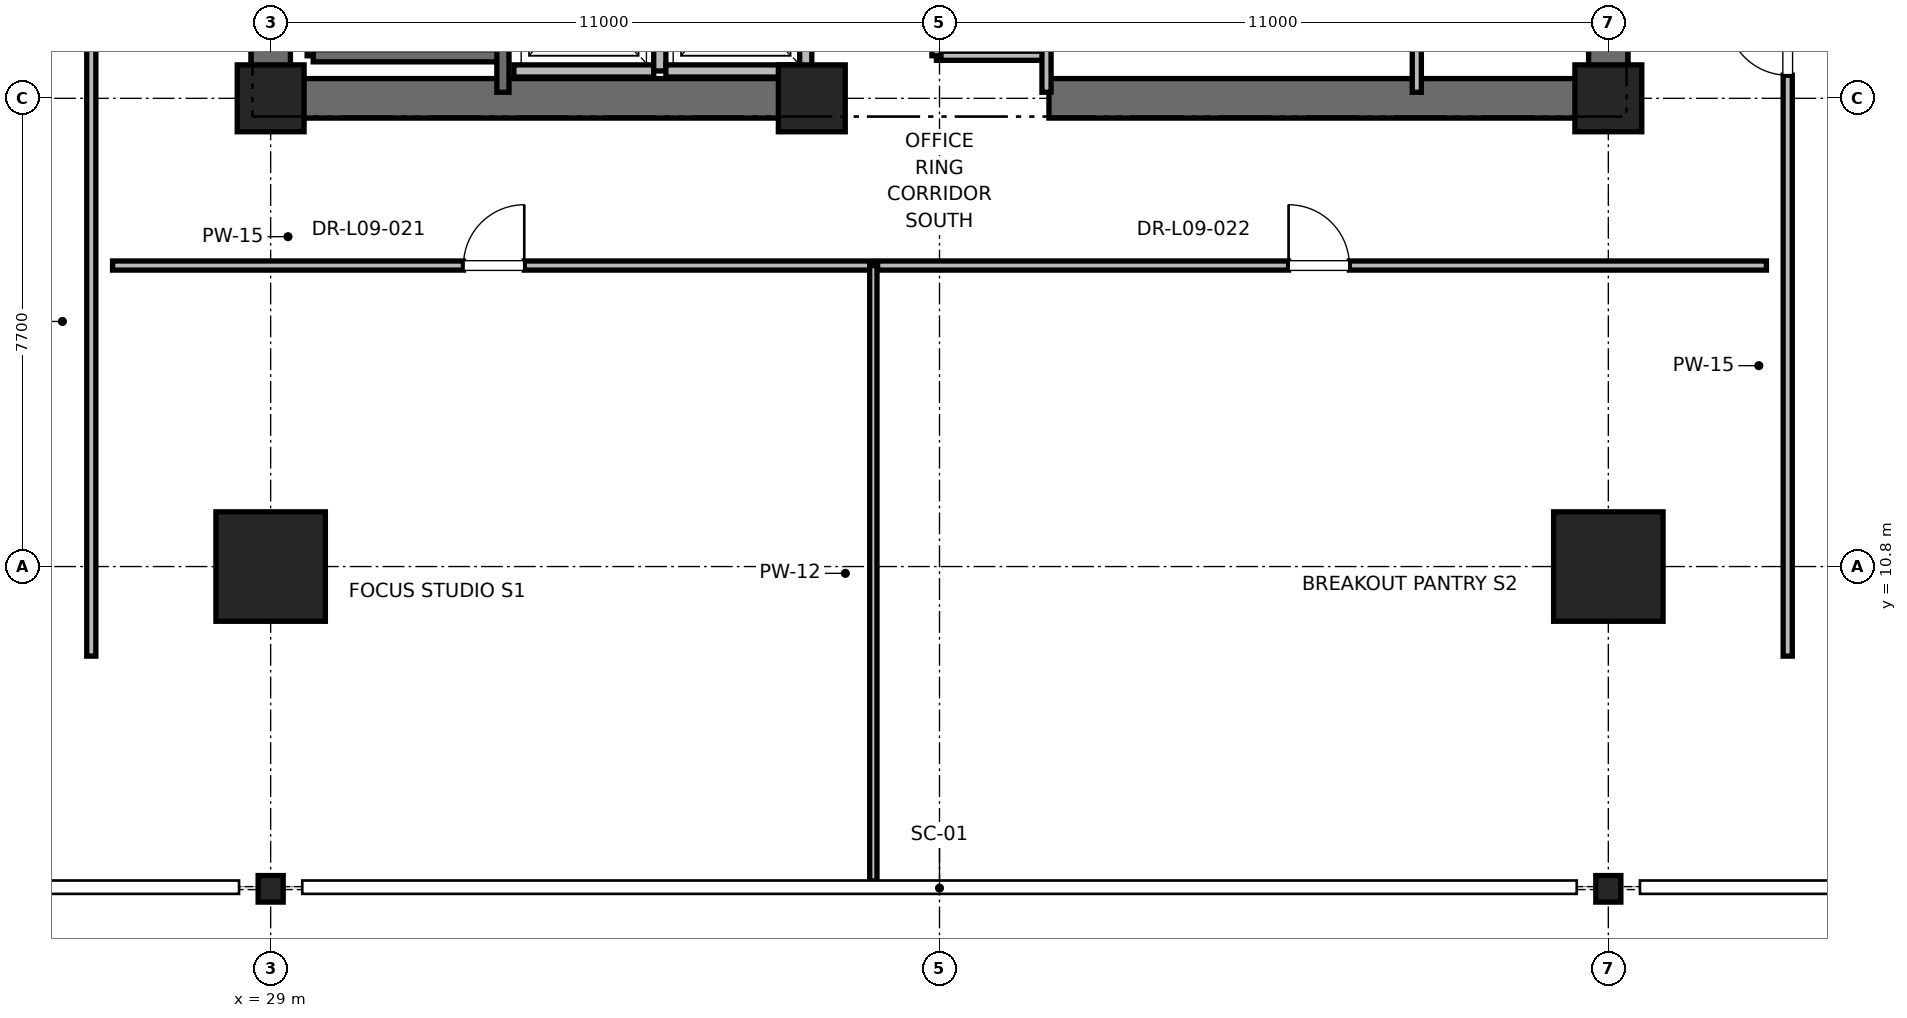
"""IFC4 building model, lengths in metres.
Left out: names, types, materials, properties, quantities, classifications, styles, units other than length and angle.
Written with IfcOpenShell. Run it as: python <this file> out.ifc"""

import sys

from ifc_helpers import new_model, si_unit, direction, frame, frame_2d, origin, origin_2d, place, context, subcontext, project, spatial, rectangle, i_section, extrude, element, fill, save


model = new_model("IFC4")
c1 = context("Model", 3, precision=1e-05, world=origin(), true_north=direction((0.0, 1.0)))
c2 = subcontext(c1, "Body", "Model", "MODEL_VIEW")
j1 = project(units=[si_unit("LENGTHUNIT", "METRE"), si_unit("PLANEANGLEUNIT", "RADIAN")], contexts=[c1])
p1 = place(None, origin())
s1 = spatial("IfcSite", under=j1, at=p1, CompositionType="ELEMENT")
p2 = place(p1, origin())
s2 = spatial("IfcBuilding", under=s1, at=p2, CompositionType="ELEMENT")
p3 = place(p2, frame((0.0, 0.0, 43.6)))
s3 = spatial("IfcBuildingStorey", under=s2, at=p3, CompositionType="ELEMENT", Elevation=43.6)
for number, where, z_axis, x_axis in (
    (1, (29.0, 10.8, 0.0), (0.0, 0.0, 1.0), (1.0, 0.0, 0.0)),
    (2, (51.0, 10.8, 0.0), (0.0, 0.0, 1.0), (1.0, 0.0, 0.0)),
):
    element("IfcColumn", number, at=place(p3, frame(where, z_axis=z_axis, x_axis=x_axis)), inside=s3, PredefinedType="COLUMN", context=c2, shape_type="SweptSolid", body=[
        extrude(rectangle(XDim=1.8, YDim=1.8, at=origin_2d()), origin(), (0.0, 0.0, 1.0), 4.0),
    ])
for number, where, z_axis, x_axis in (
    (3, (29.0, 5.5, 0.0), (0.0, 0.0, 1.0), (1.0, 0.0, 0.0)),
    (4, (51.0, 5.5, 0.0), (0.0, 0.0, 1.0), (1.0, 0.0, 0.0)),
):
    element("IfcColumn", number, at=place(p3, frame(where, z_axis=z_axis, x_axis=x_axis)), inside=s3, PredefinedType="COLUMN", context=c2, shape_type="SweptSolid", body=[
        extrude(i_section(OverallWidth=0.412, OverallDepth=0.437, WebThickness=0.036, FlangeThickness=0.058, FilletRadius=0.015, at=origin_2d()), origin(), (0.0, 0.0, 1.0), 4.0),
    ])
for number, where, z_axis, x_axis in (
    (5, (29.0, 18.5, 0.0), (0.0, 0.0, 1.0), (1.0, 0.0, 0.0)),
    (6, (51.0, 18.5, 0.0), (0.0, 0.0, 1.0), (1.0, 0.0, 0.0)),
    (7, (37.9, 18.5, 0.0), (0.0, 0.0, 1.0), (1.0, 0.0, 0.0)),
):
    element("IfcColumn", number, at=place(p3, frame(where, z_axis=z_axis, x_axis=x_axis)), inside=s3, PredefinedType="PILASTER", context=c2, shape_type="SweptSolid", body=[
        extrude(rectangle(XDim=1.1, YDim=1.1, at=origin_2d()), origin(), (0.0, 0.0, 1.0), 4.0),
    ])
for number, where, z_axis, x_axis in (
    (8, (29.0, 18.5, 0.0), (0.0, 0.0, 1.0), (1.0, 0.0, 0.0)),
    (9, (41.8, 18.5, 0.0), (0.0, 0.0, 1.0), (1.0, 0.0, 0.0)),
):
    element("IfcWall", number, at=place(p3, frame(where, z_axis=z_axis, x_axis=x_axis)), inside=s3, PredefinedType="SHEAR", context=c2, shape_type="SweptSolid", body=[
        extrude(rectangle(XDim=9.2, YDim=0.65, at=frame_2d((4.6, 0.0))), origin(), (0.0, 0.0, 1.0), 3.76),
    ])
p4 = place(p3, frame((29.0, 18.5, 0.0), z_axis=(0.0, 0.0, 1.0), x_axis=(0.0, 1.0, 0.0)))
e10 = element("IfcWall", 10, at=p4, inside=s3, PredefinedType="SHEAR", context=c2, shape_type="SweptSolid", body=[
    extrude(rectangle(XDim=8.8, YDim=0.65, at=frame_2d((4.4, 0.0))), origin(), (0.0, 0.0, 1.0), 3.76),
])
p5 = place(p3, frame((51.0, 18.5, 0.0), z_axis=(0.0, 0.0, 1.0), x_axis=(0.0, 1.0, 0.0)))
e11 = element("IfcWall", 11, at=p5, inside=s3, PredefinedType="SHEAR", context=c2, shape_type="SweptSolid", body=[
    extrude(rectangle(XDim=5.8, YDim=0.65, at=frame_2d((2.9, 0.0))), origin(), (0.0, 0.0, 1.0), 3.76),
])
p6 = place(p3, frame((29.7, 19.2, 0.0), z_axis=(0.0, 0.0, 1.0), x_axis=(0.0, 1.0, 0.0)))
e12 = element("IfcWall", 12, at=p6, inside=s3, PredefinedType="SOLIDWALL", context=c2, shape_type="SweptSolid", body=[
    extrude(rectangle(XDim=8.15, YDim=0.2, at=frame_2d((4.075, 0.0))), origin(), (0.0, 0.0, 1.0), 3.76),
])
p7 = place(p3, frame((29.7, 19.2, 0.0), z_axis=(0.0, 0.0, 1.0), x_axis=(1.0, 0.0, 0.0)))
e13 = element("IfcWall", 13, at=p7, inside=s3, PredefinedType="SOLIDWALL", context=c2, shape_type="SweptSolid", body=[
    extrude(rectangle(XDim=3.12, YDim=0.2, at=frame_2d((1.56, 0.0))), origin(), (0.0, 0.0, 1.0), 3.76),
])
p8 = place(p3, frame((32.82, 18.6, 0.0), z_axis=(0.0, 0.0, 1.0), x_axis=(0.0, 1.0, 0.0)))
e14 = element("IfcWall", 14, at=p8, inside=s3, PredefinedType="SOLIDWALL", context=c2, shape_type="SweptSolid", body=[
    extrude(rectangle(XDim=8.78, YDim=0.2, at=frame_2d((4.39, 0.0))), origin(), (0.0, 0.0, 1.0), 3.76),
])
p9 = place(p3, frame((33.0, 18.95, 0.0), z_axis=(0.0, 0.0, 1.0), x_axis=(1.0, 0.0, 0.0)))
e15 = element("IfcWall", 15, at=p9, inside=s3, PredefinedType="SOLIDWALL", context=c2, shape_type="SweptSolid", body=[
    extrude(rectangle(XDim=2.3, YDim=0.2, at=frame_2d((1.15, 0.0))), origin(), (0.0, 0.0, 1.0), 3.76),
])
p10 = place(p3, frame((35.4, 18.95, 0.0), z_axis=(0.0, 0.0, 1.0), x_axis=(0.0, 1.0, 0.0)))
e16 = element("IfcWall", 16, at=p10, inside=s3, PredefinedType="SOLIDWALL", context=c2, shape_type="SweptSolid", body=[
    extrude(rectangle(XDim=2.6, YDim=0.2, at=frame_2d((1.3, 0.0))), origin(), (0.0, 0.0, 1.0), 3.76),
])
p11 = place(p3, frame((35.5, 18.95, 0.0), z_axis=(0.0, 0.0, 1.0), x_axis=(1.0, 0.0, 0.0)))
e17 = element("IfcWall", 17, at=p11, inside=s3, PredefinedType="SOLIDWALL", context=c2, shape_type="SweptSolid", body=[
    extrude(rectangle(XDim=2.3, YDim=0.2, at=frame_2d((1.15, 0.0))), origin(), (0.0, 0.0, 1.0), 2.54),
])
p12 = place(p3, frame((37.8, 18.95, 0.0), z_axis=(0.0, 0.0, 1.0), x_axis=(0.0, 1.0, 0.0)))
e18 = element("IfcWall", 18, at=p12, inside=s3, PredefinedType="SOLIDWALL", context=c2, shape_type="SweptSolid", body=[
    extrude(rectangle(XDim=2.6, YDim=0.2, at=frame_2d((1.3, 0.0))), origin(), (0.0, 0.0, 1.0), 2.54),
])
p13 = place(p3, frame((39.95, 19.2, 0.0), z_axis=(0.0, 0.0, 1.0), x_axis=(1.0, 0.0, 0.0)))
e19 = element("IfcWall", 19, at=p13, inside=s3, PredefinedType="PARTITIONING", context=c2, shape_type="SweptSolid", body=[
    extrude(rectangle(XDim=1.81, YDim=0.15, at=frame_2d((0.905, 0.0))), origin(), (0.0, 0.0, 1.0), 2.85),
])
p14 = place(p3, frame((41.76, 18.6, 0.0), z_axis=(0.0, 0.0, 1.0), x_axis=(0.0, 1.0, 0.0)))
e20 = element("IfcWall", 20, at=p14, inside=s3, PredefinedType="PARTITIONING", context=c2, shape_type="SweptSolid", body=[
    extrude(rectangle(XDim=3.6, YDim=0.15, at=frame_2d((1.8, 0.0))), origin(), (0.0, 0.0, 1.0), 2.54),
])
p15 = place(p3, frame((39.95, 19.2, 0.0), z_axis=(0.0, 0.0, 1.0), x_axis=(0.0, 1.0, 0.0)))
e21 = element("IfcWall", 21, at=p15, inside=s3, PredefinedType="PARTITIONING", context=c2, shape_type="SweptSolid", body=[
    extrude(rectangle(XDim=3.0, YDim=0.15, at=frame_2d((1.5, 0.0))), origin(), (0.0, 0.0, 1.0), 2.85),
])
p16 = place(p15, frame((1.05, 0.0, 0.0)))
e22 = element("IfcOpeningElement", 22, at=p16, cuts=e21, PredefinedType="OPENING", context=c2, shape_type="SweptSolid", body=[
    extrude(rectangle(XDim=0.9, YDim=2.1, at=frame_2d((0.45, 1.05))), frame((0.0, 0.075, 0.0), z_axis=(0.0, -1.0, 0.0), x_axis=(1.0, 0.0, 0.0)), (0.0, 0.0, 1.0), 0.15),
])
p17 = place(p3, frame((47.85, 18.6, 0.0), z_axis=(0.0, 0.0, 1.0), x_axis=(0.0, 1.0, 0.0)))
e23 = element("IfcWall", 23, at=p17, inside=s3, PredefinedType="PARTITIONING", context=c2, shape_type="SweptSolid", body=[
    extrude(rectangle(XDim=2.54, YDim=0.15, at=frame_2d((1.27, 0.0))), origin(), (0.0, 0.0, 1.0), 2.85),
])
p18 = place(p3, frame((26.4, 15.75, 0.0), z_axis=(0.0, 0.0, 1.0), x_axis=(1.0, 0.0, 0.0)))
e24 = element("IfcWall", 24, at=p18, inside=s3, PredefinedType="PARTITIONING", context=c2, shape_type="SweptSolid", body=[
    extrude(rectangle(XDim=12.512, YDim=0.15, at=frame_2d((6.256, 0.0))), origin(), (0.0, 0.0, 1.0), 2.85),
])
p19 = place(p18, frame((5.771, 0.0, 0.0)))
e25 = element("IfcOpeningElement", 25, at=p19, cuts=e24, PredefinedType="OPENING", context=c2, shape_type="SweptSolid", body=[
    extrude(rectangle(XDim=1.0, YDim=2.15, at=frame_2d((0.5, 1.075))), frame((0.0, 0.075, 0.0), z_axis=(0.0, -1.0, 0.0), x_axis=(1.0, 0.0, 0.0)), (0.0, 0.0, 1.0), 0.15),
])
p20 = place(p3, frame((38.912, 5.627, 0.0), z_axis=(0.0, 0.0, 1.0), x_axis=(0.0, 1.0, 0.0)))
e26 = element("IfcWall", 26, at=p20, inside=s3, PredefinedType="PARTITIONING", context=c2, shape_type="SweptSolid", body=[
    extrude(rectangle(XDim=10.123, YDim=0.12, at=frame_2d((5.062, 0.0))), origin(), (0.0, 0.0, 1.0), 2.39),
])
p21 = place(p3, frame((38.982, 15.75, 0.0), z_axis=(0.0, 0.0, 1.0), x_axis=(1.0, 0.0, 0.0)))
e27 = element("IfcWall", 27, at=p21, inside=s3, PredefinedType="PARTITIONING", context=c2, shape_type="SweptSolid", body=[
    extrude(rectangle(XDim=14.618, YDim=0.15, at=frame_2d((7.309, 0.0))), origin(), (0.0, 0.0, 1.0), 2.85),
])
p22 = place(p21, frame((6.759, 0.0, 0.0)))
e28 = element("IfcOpeningElement", 28, at=p22, cuts=e27, PredefinedType="OPENING", context=c2, shape_type="SweptSolid", body=[
    extrude(rectangle(XDim=1.0, YDim=2.15, at=frame_2d((0.5, 1.075))), frame((0.0, 0.075, 0.0), z_axis=(0.0, -1.0, 0.0), x_axis=(1.0, 0.0, 0.0)), (0.0, 0.0, 1.0), 0.15),
])
p23 = place(p3, frame((26.05, 9.327, 0.0), z_axis=(0.0, 0.0, 1.0), x_axis=(0.0, 1.0, 0.0)))
e29 = element("IfcWall", 29, at=p23, inside=s3, PredefinedType="PARTITIONING", context=c2, shape_type="SweptSolid", body=[
    extrude(rectangle(XDim=13.812, YDim=0.15, at=frame_2d((6.906, 0.0))), origin(), (0.0, 0.0, 1.0), 2.85),
])
p24 = place(p23, frame((11.007, 0.0, 0.0)))
e30 = element("IfcOpeningElement", 30, at=p24, cuts=e29, PredefinedType="OPENING", context=c2, shape_type="SweptSolid", body=[
    extrude(rectangle(XDim=1.0, YDim=2.15, at=frame_2d((0.5, 1.075))), frame((0.0, 0.075, 0.0), z_axis=(0.0, -1.0, 0.0), x_axis=(1.0, 0.0, 0.0)), (0.0, 0.0, 1.0), 0.15),
])
p25 = place(p3, frame((53.95, 9.327, 0.0), z_axis=(0.0, 0.0, 1.0), x_axis=(0.0, 1.0, 0.0)))
e31 = element("IfcWall", 31, at=p25, inside=s3, PredefinedType="PARTITIONING", context=c2, shape_type="SweptSolid", body=[
    extrude(rectangle(XDim=10.904, YDim=0.15, at=frame_2d((5.452, 0.0))), origin(), (0.0, 0.0, 1.0), 2.85),
])
p26 = place(p25, frame((9.553, 0.0, 0.0)))
e32 = element("IfcOpeningElement", 32, at=p26, cuts=e31, PredefinedType="OPENING", context=c2, shape_type="SweptSolid", body=[
    extrude(rectangle(XDim=1.0, YDim=2.15, at=frame_2d((0.5, 1.075))), frame((0.0, 0.075, 0.0), z_axis=(0.0, -1.0, 0.0), x_axis=(1.0, 0.0, 0.0)), (0.0, 0.0, 1.0), 0.15),
])
p27 = place(p19, origin())
e33 = element("IfcDoor", 33, at=p27, inside=s3, OperationType="SINGLE_SWING_RIGHT", PredefinedType="DOOR", context=c2, shape_type="SweptSolid", body=[
    extrude(rectangle(XDim=1.0, YDim=2.15, at=frame_2d((0.5, 1.075))), frame((0.0, 0.025, 0.0), z_axis=(0.0, -1.0, 0.0), x_axis=(1.0, 0.0, 0.0)), (0.0, 0.0, 1.0), 0.05),
])
fill(e25, e33)
p28 = place(p22, origin())
e34 = element("IfcDoor", 34, at=p28, inside=s3, OperationType="SINGLE_SWING_LEFT", PredefinedType="DOOR", context=c2, shape_type="SweptSolid", body=[
    extrude(rectangle(XDim=1.0, YDim=2.15, at=frame_2d((0.5, 1.075))), frame((0.0, 0.025, 0.0), z_axis=(0.0, -1.0, 0.0), x_axis=(1.0, 0.0, 0.0)), (0.0, 0.0, 1.0), 0.05),
])
fill(e28, e34)
p29 = place(p26, origin())
e35 = element("IfcDoor", 35, at=p29, inside=s3, OperationType="SINGLE_SWING_RIGHT", PredefinedType="DOOR", context=c2, shape_type="SweptSolid", body=[
    extrude(rectangle(XDim=1.0, YDim=2.15, at=frame_2d((0.5, 1.075))), frame((0.0, 0.025, 0.0), z_axis=(0.0, -1.0, 0.0), x_axis=(1.0, 0.0, 0.0)), (0.0, 0.0, 1.0), 0.05),
])
fill(e32, e35)
save(model, sys.argv[1])
